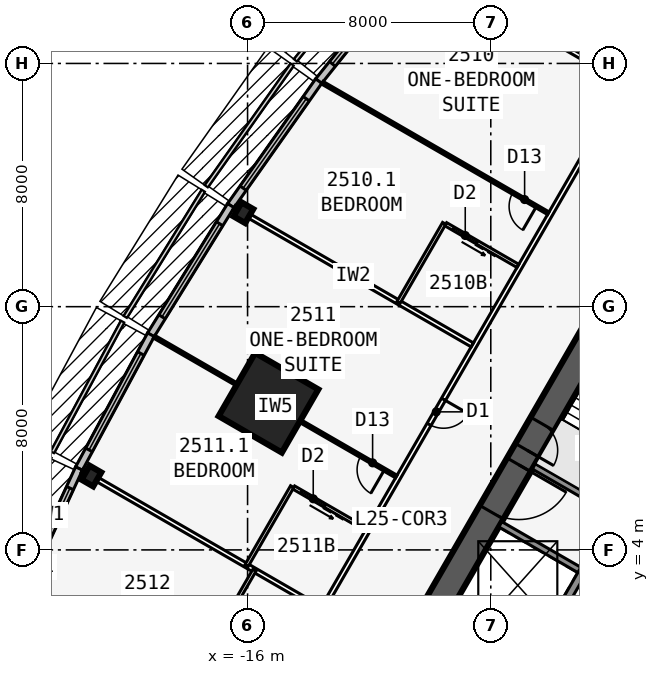
"""IFC4 building model, lengths in metres.
Left out: names, types, materials, properties, quantities, classifications, styles, units other than length and angle.
Written with IfcOpenShell. Run it as: python <this file> out.ifc"""

import sys

from ifc_helpers import new_model, si_unit, direction, frame, frame_2d, origin, origin_2d, place, context, subcontext, project, spatial, rectangle, i_section, extrude, element, fill, save


model = new_model("IFC4")
c1 = context("Model", 3, precision=1e-05, world=origin(), true_north=direction((0.0, 1.0)))
c2 = subcontext(c1, "Body", "Model", "MODEL_VIEW")
j1 = project(units=[si_unit("LENGTHUNIT", "METRE"), si_unit("PLANEANGLEUNIT", "RADIAN")], contexts=[c1])
p1 = place(None, origin())
s1 = spatial("IfcSite", under=j1, at=p1, CompositionType="ELEMENT")
p2 = place(p1, origin())
s2 = spatial("IfcBuilding", under=s1, at=p2, CompositionType="ELEMENT")
p3 = place(p2, frame((0.0, 0.0, 96.5)))
s3 = spatial("IfcBuildingStorey", under=s2, at=p3, CompositionType="ELEMENT", Elevation=96.5)
p4 = place(p3, frame((0.0, 19.052, 0.0), z_axis=(0.0, 0.0, 1.0), x_axis=(-0.499999749417, -0.866025548458, 0.0)))
e1 = element("IfcWall", 1, at=p4, inside=s3, PredefinedType="SHEAR", context=c2, shape_type="SweptSolid", body=[
    extrude(rectangle(XDim=33.0, YDim=0.9, at=frame_2d((16.5, 0.0))), origin(), (0.0, 0.0, 1.0), 3.4),
])
p5 = place(p4, frame((14.15, 0.0, 0.0)))
e2 = element("IfcOpeningElement", 2, at=p5, cuts=e1, PredefinedType="OPENING", context=c2, shape_type="SweptSolid", body=[
    extrude(rectangle(XDim=1.8, YDim=2.13, at=frame_2d((0.9, 1.065))), frame((0.0, 0.46, 0.0), z_axis=(0.0, -1.0, 0.0), x_axis=(1.0, 0.0, 0.0)), (0.0, 0.0, 1.0), 0.92),
])
p6 = place(p4, frame((12.6, 0.0, 0.0)))
e3 = element("IfcOpeningElement", 3, at=p6, cuts=e1, PredefinedType="OPENING", context=c2, shape_type="SweptSolid", body=[
    extrude(rectangle(XDim=1.0, YDim=2.13, at=frame_2d((0.5, 1.065))), frame((0.0, 0.46, 0.0), z_axis=(0.0, -1.0, 0.0), x_axis=(1.0, 0.0, 0.0)), (0.0, 0.0, 1.0), 0.92),
])
p7 = place(p3, frame((-4.929, 3.365, 0.0), z_axis=(0.0, 0.0, 1.0), x_axis=(-0.499991433582, -0.866030349552, 0.0)))
e4 = element("IfcWall", 4, at=p7, inside=s3, PredefinedType="SOLIDWALL", context=c2, shape_type="SweptSolid", body=[
    extrude(rectangle(XDim=10.633, YDim=0.25, at=frame_2d((5.316, 0.0))), origin(), (0.0, 0.0, 1.0), 3.235),
])
p8 = place(p7, frame((9.164, 0.0, 0.0)))
e5 = element("IfcOpeningElement", 5, at=p8, cuts=e4, PredefinedType="OPENING", context=c2, shape_type="SweptSolid", body=[
    extrude(rectangle(XDim=0.9, YDim=2.13, at=frame_2d((0.45, 1.065))), frame((0.0, 0.135, 0.0), z_axis=(0.0, -1.0, 0.0), x_axis=(1.0, 0.0, 0.0)), (0.0, 0.0, 1.0), 0.27),
])
for number, where, z_axis, x_axis in (
    (6, (-3.879, 5.184, 0.0), (0.0, 0.0, 1.0), (-0.866, 0.5, 0.0)),
    (7, (-4.979, 3.279, 0.0), (0.0, 0.0, 1.0), (-0.866, 0.5, 0.0)),
):
    element("IfcWall", number, at=place(p3, frame(where, z_axis=z_axis, x_axis=x_axis)), inside=s3, PredefinedType="SOLIDWALL", context=c2, shape_type="SweptSolid", body=[
        extrude(rectangle(XDim=3.125, YDim=0.2, at=frame_2d((1.562, 0.0))), origin(), (0.0, 0.0, 1.0), 3.235),
    ])
for number, where, z_axis, x_axis in (
    (8, (-16.137, 15.09, 0.0), (0.0, 0.0, 1.0), (-0.866, 0.5, 0.0)),
    (9, (-21.137, 6.43, 0.0), (0.0, 0.0, 1.0), (-0.866, 0.5, 0.0)),
):
    element("IfcColumn", number, at=place(p3, frame(where, z_axis=z_axis, x_axis=x_axis)), inside=s3, PredefinedType="COLUMN", context=c2, shape_type="SweptSolid", body=[
        extrude(i_section(OverallWidth=0.442, OverallDepth=0.531, WebThickness=0.066, FlangeThickness=0.106, at=origin_2d()), origin(), (0.0, 0.0, 1.0), 3.4),
    ])
p9 = place(p3, frame((-15.312, 8.84, 0.0), z_axis=(0.0, 0.0, 1.0), x_axis=(-0.866025403784, 0.5, 0.0)))
e10 = element("IfcColumn", 10, at=p9, inside=s3, PredefinedType="COLUMN", context=c2, shape_type="SweptSolid", body=[
    extrude(rectangle(XDim=2.4, YDim=2.4, at=origin_2d()), origin(), (0.0, 0.0, 1.0), 3.4),
])
p10 = place(p3, frame((-10.505, 23.364, 0.0), z_axis=(0.0, 0.0, 1.0), x_axis=(-0.624594965756, -0.780948864364, 0.0)))
e11 = element("IfcWall", 11, at=p10, inside=s3, PredefinedType="STANDARD", context=c2, shape_type="SweptSolid", body=[
    extrude(rectangle(XDim=5.058, YDim=0.25, at=frame_2d((2.529, 0.0))), origin(), (0.0, 0.0, 1.0), 3.235),
])
p11 = place(p10, frame((0.729, 0.0, 0.45)))
e12 = element("IfcOpeningElement", 12, at=p11, cuts=e11, PredefinedType="OPENING", context=c2, shape_type="SweptSolid", body=[
    extrude(rectangle(XDim=3.6, YDim=2.4, at=frame_2d((1.8, 1.2))), frame((0.0, 0.135, 0.0), z_axis=(0.0, -1.0, 0.0), x_axis=(1.0, 0.0, 0.0)), (0.0, 0.0, 1.0), 0.27),
])
p12 = place(p3, frame((-13.659, 19.42, 0.0), z_axis=(0.0, 0.0, 1.0), x_axis=(-0.5766431066, -0.81699616132, 0.0)))
e13 = element("IfcWall", 13, at=p12, inside=s3, PredefinedType="STANDARD", context=c2, shape_type="SweptSolid", body=[
    extrude(rectangle(XDim=5.021, YDim=0.25, at=frame_2d((2.51, 0.0))), origin(), (0.0, 0.0, 1.0), 3.235),
])
p13 = place(p12, frame((0.71, 0.0, 0.45)))
e14 = element("IfcOpeningElement", 14, at=p13, cuts=e13, PredefinedType="OPENING", context=c2, shape_type="SweptSolid", body=[
    extrude(rectangle(XDim=3.6, YDim=2.4, at=frame_2d((1.8, 1.2))), frame((0.0, 0.135, 0.0), z_axis=(0.0, -1.0, 0.0), x_axis=(1.0, 0.0, 0.0)), (0.0, 0.0, 1.0), 0.27),
])
p14 = place(p3, frame((-16.551, 15.324, 0.0), z_axis=(0.0, 0.0, 1.0), x_axis=(-0.526132807704, -0.850402415717, 0.0)))
e15 = element("IfcWall", 15, at=p14, inside=s3, PredefinedType="STANDARD", context=c2, shape_type="SweptSolid", body=[
    extrude(rectangle(XDim=5.002, YDim=0.25, at=frame_2d((2.501, 0.0))), origin(), (0.0, 0.0, 1.0), 3.235),
])
p15 = place(p14, frame((0.701, 0.0, 0.45)))
e16 = element("IfcOpeningElement", 16, at=p15, cuts=e15, PredefinedType="OPENING", context=c2, shape_type="SweptSolid", body=[
    extrude(rectangle(XDim=3.6, YDim=2.4, at=frame_2d((1.8, 1.2))), frame((0.0, 0.135, 0.0), z_axis=(0.0, -1.0, 0.0), x_axis=(1.0, 0.0, 0.0)), (0.0, 0.0, 1.0), 0.27),
])
p16 = place(p3, frame((-19.178, 11.077, 0.0), z_axis=(0.0, 0.0, 1.0), x_axis=(-0.473412820489, -0.880840678782, 0.0)))
e17 = element("IfcWall", 17, at=p16, inside=s3, PredefinedType="STANDARD", context=c2, shape_type="SweptSolid", body=[
    extrude(rectangle(XDim=5.002, YDim=0.25, at=frame_2d((2.501, 0.0))), origin(), (0.0, 0.0, 1.0), 3.235),
])
p17 = place(p16, frame((0.701, 0.0, 0.45)))
e18 = element("IfcOpeningElement", 18, at=p17, cuts=e17, PredefinedType="OPENING", context=c2, shape_type="SweptSolid", body=[
    extrude(rectangle(XDim=3.6, YDim=2.4, at=frame_2d((1.8, 1.2))), frame((0.0, 0.135, 0.0), z_axis=(0.0, -1.0, 0.0), x_axis=(1.0, 0.0, 0.0)), (0.0, 0.0, 1.0), 0.27),
])
p18 = place(p3, frame((-21.543, 6.678, 0.0), z_axis=(0.0, 0.0, 1.0), x_axis=(-0.419203100754, -0.907892482796, 0.0)))
e19 = element("IfcWall", 19, at=p18, inside=s3, PredefinedType="STANDARD", context=c2, shape_type="SweptSolid", body=[
    extrude(rectangle(XDim=5.021, YDim=0.25, at=frame_2d((2.51, 0.0))), origin(), (0.0, 0.0, 1.0), 3.235),
])
p19 = place(p18, frame((0.71, 0.0, 0.45)))
e20 = element("IfcOpeningElement", 20, at=p19, cuts=e19, PredefinedType="OPENING", context=c2, shape_type="SweptSolid", body=[
    extrude(rectangle(XDim=3.6, YDim=2.4, at=frame_2d((1.8, 1.2))), frame((0.0, 0.135, 0.0), z_axis=(0.0, -1.0, 0.0), x_axis=(1.0, 0.0, 0.0)), (0.0, 0.0, 1.0), 0.27),
])
p20 = place(p3, frame((-0.5, 24.636, 0.0), z_axis=(0.0, 0.0, 1.0), x_axis=(-0.500001915564, -0.86602429783, 0.0)))
e21 = element("IfcWall", 21, at=p20, inside=s3, PredefinedType="PARTITIONING", context=c2, shape_type="SweptSolid", body=[
    extrude(rectangle(XDim=42.172, YDim=0.15, at=frame_2d((21.086, 0.0))), origin(), (0.0, 0.0, 1.0), 3.235),
])
p21 = place(p20, frame((1.911, 0.0, 0.0)))
e22 = element("IfcOpeningElement", 22, at=p21, cuts=e21, PredefinedType="OPENING", context=c2, shape_type="SweptSolid", body=[
    extrude(rectangle(XDim=0.95, YDim=2.13, at=frame_2d((0.475, 1.065))), frame((0.0, 0.085, 0.0), z_axis=(0.0, -1.0, 0.0), x_axis=(1.0, 0.0, 0.0)), (0.0, 0.0, 1.0), 0.17),
])
p22 = place(p20, frame((8.111, 0.0, 0.0)))
e23 = element("IfcOpeningElement", 23, at=p22, cuts=e21, PredefinedType="OPENING", context=c2, shape_type="SweptSolid", body=[
    extrude(rectangle(XDim=0.95, YDim=2.13, at=frame_2d((0.475, 1.065))), frame((0.0, 0.085, 0.0), z_axis=(0.0, -1.0, 0.0), x_axis=(1.0, 0.0, 0.0)), (0.0, 0.0, 1.0), 0.17),
])
p23 = place(p20, frame((18.111, 0.0, 0.0)))
e24 = element("IfcOpeningElement", 24, at=p23, cuts=e21, PredefinedType="OPENING", context=c2, shape_type="SweptSolid", body=[
    extrude(rectangle(XDim=0.95, YDim=2.13, at=frame_2d((0.475, 1.065))), frame((0.0, 0.085, 0.0), z_axis=(0.0, -1.0, 0.0), x_axis=(1.0, 0.0, 0.0)), (0.0, 0.0, 1.0), 0.17),
])
p24 = place(p20, frame((28.711, 0.0, 0.0)))
e25 = element("IfcOpeningElement", 25, at=p24, cuts=e21, PredefinedType="OPENING", context=c2, shape_type="SweptSolid", body=[
    extrude(rectangle(XDim=0.95, YDim=2.13, at=frame_2d((0.475, 1.065))), frame((0.0, 0.085, 0.0), z_axis=(0.0, -1.0, 0.0), x_axis=(1.0, 0.0, 0.0)), (0.0, 0.0, 1.0), 0.17),
])
p25 = place(p20, frame((33.711, 0.0, 0.0)))
e26 = element("IfcOpeningElement", 26, at=p25, cuts=e21, PredefinedType="OPENING", context=c2, shape_type="SweptSolid", body=[
    extrude(rectangle(XDim=0.95, YDim=2.13, at=frame_2d((0.475, 1.065))), frame((0.0, 0.085, 0.0), z_axis=(0.0, -1.0, 0.0), x_axis=(1.0, 0.0, 0.0)), (0.0, 0.0, 1.0), 0.17),
])
p26 = place(p20, frame((39.311, 0.0, 0.0)))
e27 = element("IfcOpeningElement", 27, at=p26, cuts=e21, PredefinedType="OPENING", context=c2, shape_type="SweptSolid", body=[
    extrude(rectangle(XDim=0.95, YDim=2.13, at=frame_2d((0.475, 1.065))), frame((0.0, 0.085, 0.0), z_axis=(0.0, -1.0, 0.0), x_axis=(1.0, 0.0, 0.0)), (0.0, 0.0, 1.0), 0.17),
])
p27 = place(p3, frame((-3.608, 19.404, 0.0), z_axis=(0.0, 0.0, 1.0), x_axis=(-0.866021300503, 0.500007107024, 0.0)))
e28 = element("IfcWall", 28, at=p27, inside=s3, PredefinedType="PARTITIONING", context=c2, shape_type="SweptSolid", body=[
    extrude(rectangle(XDim=7.82, YDim=0.15, at=frame_2d((3.91, 0.0))), origin(), (0.0, 0.0, 1.0), 2.389),
])
p28 = place(p3, frame((-6.108, 15.073, 0.0), z_axis=(0.0, 0.0, 1.0), x_axis=(-0.866031196456, 0.499989966665, 0.0)))
e29 = element("IfcWall", 29, at=p28, inside=s3, PredefinedType="PARTITIONING", context=c2, shape_type="SweptSolid", body=[
    extrude(rectangle(XDim=8.585, YDim=0.1, at=frame_2d((4.292, 0.0))), origin(), (0.0, 0.0, 1.0), 2.389),
])
p29 = place(p28, frame((0.45, 0.0, 0.0)))
e30 = element("IfcOpeningElement", 30, at=p29, cuts=e29, PredefinedType="OPENING", context=c2, shape_type="SweptSolid", body=[
    extrude(rectangle(XDim=0.9, YDim=2.13, at=frame_2d((0.45, 1.065))), frame((0.0, 0.06, 0.0), z_axis=(0.0, -1.0, 0.0), x_axis=(1.0, 0.0, 0.0)), (0.0, 0.0, 1.0), 0.12),
])
p30 = place(p3, frame((-8.608, 10.743, 0.0), z_axis=(0.0, 0.0, 1.0), x_axis=(-0.866028232062, 0.499995101247, 0.0)))
e31 = element("IfcWall", 31, at=p30, inside=s3, PredefinedType="PARTITIONING", context=c2, shape_type="SweptSolid", body=[
    extrude(rectangle(XDim=9.043, YDim=0.15, at=frame_2d((4.521, 0.0))), origin(), (0.0, 0.0, 1.0), 2.389),
])
p31 = place(p3, frame((-11.108, 6.413, 0.0), z_axis=(0.0, 0.0, 1.0), x_axis=(-0.866022450903, 0.500005114506, 0.0)))
e32 = element("IfcWall", 32, at=p31, inside=s3, PredefinedType="PARTITIONING", context=c2, shape_type="SweptSolid", body=[
    extrude(rectangle(XDim=9.196, YDim=0.1, at=frame_2d((4.598, 0.0))), origin(), (0.0, 0.0, 1.0), 2.389),
])
p32 = place(p31, frame((0.45, 0.0, 0.0)))
e33 = element("IfcOpeningElement", 33, at=p32, cuts=e32, PredefinedType="OPENING", context=c2, shape_type="SweptSolid", body=[
    extrude(rectangle(XDim=0.9, YDim=2.13, at=frame_2d((0.45, 1.065))), frame((0.0, 0.06, 0.0), z_axis=(0.0, -1.0, 0.0), x_axis=(1.0, 0.0, 0.0)), (0.0, 0.0, 1.0), 0.12),
])
p33 = place(p3, frame((-13.608, 2.083, 0.0), z_axis=(0.0, 0.0, 1.0), x_axis=(-0.866028232062, 0.499995101247, 0.0)))
e34 = element("IfcWall", 34, at=p33, inside=s3, PredefinedType="PARTITIONING", context=c2, shape_type="SweptSolid", body=[
    extrude(rectangle(XDim=9.043, YDim=0.15, at=frame_2d((4.521, 0.0))), origin(), (0.0, 0.0, 1.0), 2.389),
])
p34 = place(p3, frame((-9.533, 14.741, 0.0), z_axis=(0.0, 0.0, 1.0), x_axis=(-0.50002537861, -0.866010750942, 0.0)))
e35 = element("IfcWall", 35, at=p34, inside=s3, PredefinedType="PLUMBINGWALL", context=c2, shape_type="SweptSolid", body=[
    extrude(rectangle(XDim=3.0, YDim=0.12, at=frame_2d((1.5, 0.0))), origin(), (0.0, 0.0, 1.0), 3.235),
])
p35 = place(p3, frame((-7.108, 13.341, 0.0), z_axis=(0.0, 0.0, 1.0), x_axis=(-0.866035715982, 0.499982138324, 0.0)))
e36 = element("IfcWall", 36, at=p35, inside=s3, PredefinedType="PLUMBINGWALL", context=c2, shape_type="SweptSolid", body=[
    extrude(rectangle(XDim=2.74, YDim=0.12, at=frame_2d((1.37, 0.0))), origin(), (0.0, 0.0, 1.0), 3.235),
])
p36 = place(p35, frame((1.55, 0.0, 0.0)))
e37 = element("IfcOpeningElement", 37, at=p36, cuts=e36, PredefinedType="OPENING", context=c2, shape_type="SweptSolid", body=[
    extrude(rectangle(XDim=0.9, YDim=2.13, at=frame_2d((0.45, 1.065))), frame((0.0, 0.07, 0.0), z_axis=(0.0, -1.0, 0.0), x_axis=(1.0, 0.0, 0.0)), (0.0, 0.0, 1.0), 0.14),
])
p37 = place(p3, frame((-14.533, 6.081, 0.0), z_axis=(0.0, 0.0, 1.0), x_axis=(-0.499990139034, -0.866031096941, 0.0)))
e38 = element("IfcWall", 38, at=p37, inside=s3, PredefinedType="PLUMBINGWALL", context=c2, shape_type="SweptSolid", body=[
    extrude(rectangle(XDim=3.0, YDim=0.12, at=frame_2d((1.5, 0.0))), origin(), (0.0, 0.0, 1.0), 3.235),
])
p38 = place(p3, frame((-12.108, 4.681, 0.0), z_axis=(0.0, 0.0, 1.0), x_axis=(-0.866035715982, 0.499982138324, 0.0)))
e39 = element("IfcWall", 39, at=p38, inside=s3, PredefinedType="PLUMBINGWALL", context=c2, shape_type="SweptSolid", body=[
    extrude(rectangle(XDim=2.74, YDim=0.12, at=frame_2d((1.37, 0.0))), origin(), (0.0, 0.0, 1.0), 3.235),
])
p39 = place(p38, frame((1.55, 0.0, 0.0)))
e40 = element("IfcOpeningElement", 40, at=p39, cuts=e39, PredefinedType="OPENING", context=c2, shape_type="SweptSolid", body=[
    extrude(rectangle(XDim=0.9, YDim=2.13, at=frame_2d((0.45, 1.065))), frame((0.0, 0.07, 0.0), z_axis=(0.0, -1.0, 0.0), x_axis=(1.0, 0.0, 0.0)), (0.0, 0.0, 1.0), 0.14),
])
p40 = place(p3, frame((-15.773, 3.333, 0.0), z_axis=(0.0, 0.0, 1.0), x_axis=(-0.500001309137, -0.866024647952, 0.0)))
e41 = element("IfcWall", 41, at=p40, inside=s3, PredefinedType="PLUMBINGWALL", context=c2, shape_type="SweptSolid", body=[
    extrude(rectangle(XDim=2.4, YDim=0.12, at=frame_2d((1.2, 0.0))), origin(), (0.0, 0.0, 1.0), 3.235),
])
p41 = place(p11, origin())
e42 = element("IfcWindow", 42, at=p41, inside=s3, PartitioningType="SINGLE_PANEL", PredefinedType="WINDOW", context=c2, shape_type="SweptSolid", body=[
    extrude(rectangle(XDim=3.6, YDim=2.4, at=frame_2d((1.8, 1.2))), frame((0.0, 0.03, 0.0), z_axis=(0.0, -1.0, 0.0), x_axis=(1.0, 0.0, 0.0)), (0.0, 0.0, 1.0), 0.06),
])
fill(e12, e42)
p42 = place(p13, origin())
e43 = element("IfcWindow", 43, at=p42, inside=s3, PartitioningType="SINGLE_PANEL", PredefinedType="WINDOW", context=c2, shape_type="SweptSolid", body=[
    extrude(rectangle(XDim=3.6, YDim=2.4, at=frame_2d((1.8, 1.2))), frame((0.0, 0.03, 0.0), z_axis=(0.0, -1.0, 0.0), x_axis=(1.0, 0.0, 0.0)), (0.0, 0.0, 1.0), 0.06),
])
fill(e14, e43)
p43 = place(p15, origin())
e44 = element("IfcWindow", 44, at=p43, inside=s3, PartitioningType="SINGLE_PANEL", PredefinedType="WINDOW", context=c2, shape_type="SweptSolid", body=[
    extrude(rectangle(XDim=3.6, YDim=2.4, at=frame_2d((1.8, 1.2))), frame((0.0, 0.03, 0.0), z_axis=(0.0, -1.0, 0.0), x_axis=(1.0, 0.0, 0.0)), (0.0, 0.0, 1.0), 0.06),
])
fill(e16, e44)
p44 = place(p17, origin())
e45 = element("IfcWindow", 45, at=p44, inside=s3, PartitioningType="SINGLE_PANEL", PredefinedType="WINDOW", context=c2, shape_type="SweptSolid", body=[
    extrude(rectangle(XDim=3.6, YDim=2.4, at=frame_2d((1.8, 1.2))), frame((0.0, 0.03, 0.0), z_axis=(0.0, -1.0, 0.0), x_axis=(1.0, 0.0, 0.0)), (0.0, 0.0, 1.0), 0.06),
])
fill(e18, e45)
p45 = place(p19, origin())
e46 = element("IfcWindow", 46, at=p45, inside=s3, PartitioningType="SINGLE_PANEL", PredefinedType="WINDOW", context=c2, shape_type="SweptSolid", body=[
    extrude(rectangle(XDim=3.6, YDim=2.4, at=frame_2d((1.8, 1.2))), frame((0.0, 0.03, 0.0), z_axis=(0.0, -1.0, 0.0), x_axis=(1.0, 0.0, 0.0)), (0.0, 0.0, 1.0), 0.06),
])
fill(e20, e46)
p46 = place(p29, origin())
e47 = element("IfcDoor", 47, at=p46, inside=s3, OperationType="SINGLE_SWING_LEFT", PredefinedType="DOOR", context=c2, shape_type="SweptSolid", body=[
    extrude(rectangle(XDim=0.9, YDim=2.13, at=frame_2d((0.45, 1.065))), frame((0.0, 0.025, 0.0), z_axis=(0.0, -1.0, 0.0), x_axis=(1.0, 0.0, 0.0)), (0.0, 0.0, 1.0), 0.05),
])
fill(e30, e47)
p47 = place(p32, origin())
e48 = element("IfcDoor", 48, at=p47, inside=s3, OperationType="SINGLE_SWING_LEFT", PredefinedType="DOOR", context=c2, shape_type="SweptSolid", body=[
    extrude(rectangle(XDim=0.9, YDim=2.13, at=frame_2d((0.45, 1.065))), frame((0.0, 0.025, 0.0), z_axis=(0.0, -1.0, 0.0), x_axis=(1.0, 0.0, 0.0)), (0.0, 0.0, 1.0), 0.05),
])
fill(e33, e48)
p48 = place(p36, origin())
e49 = element("IfcDoor", 49, at=p48, inside=s3, OperationType="SLIDING_TO_LEFT", PredefinedType="DOOR", context=c2, shape_type="SweptSolid", body=[
    extrude(rectangle(XDim=0.9, YDim=2.13, at=frame_2d((0.45, 1.065))), frame((0.0, 0.025, 0.0), z_axis=(0.0, -1.0, 0.0), x_axis=(1.0, 0.0, 0.0)), (0.0, 0.0, 1.0), 0.05),
])
fill(e37, e49)
p49 = place(p23, origin())
e50 = element("IfcDoor", 50, at=p49, inside=s3, OperationType="SINGLE_SWING_LEFT", PredefinedType="DOOR", context=c2, shape_type="SweptSolid", body=[
    extrude(rectangle(XDim=0.95, YDim=2.13, at=frame_2d((0.475, 1.065))), frame((0.0, 0.025, 0.0), z_axis=(0.0, -1.0, 0.0), x_axis=(1.0, 0.0, 0.0)), (0.0, 0.0, 1.0), 0.05),
])
fill(e24, e50)
p50 = place(p39, origin())
e51 = element("IfcDoor", 51, at=p50, inside=s3, OperationType="SLIDING_TO_LEFT", PredefinedType="DOOR", context=c2, shape_type="SweptSolid", body=[
    extrude(rectangle(XDim=0.9, YDim=2.13, at=frame_2d((0.45, 1.065))), frame((0.0, 0.025, 0.0), z_axis=(0.0, -1.0, 0.0), x_axis=(1.0, 0.0, 0.0)), (0.0, 0.0, 1.0), 0.05),
])
fill(e40, e51)
p51 = place(p5, origin())
e52 = element("IfcDoor", 52, at=p51, inside=s3, OperationType="DOUBLE_DOOR_SINGLE_SWING", PredefinedType="DOOR", context=c2, shape_type="SweptSolid", body=[
    extrude(rectangle(XDim=1.8, YDim=2.13, at=frame_2d((0.9, 1.065))), frame((0.0, 0.025, 0.0), z_axis=(0.0, -1.0, 0.0), x_axis=(1.0, 0.0, 0.0)), (0.0, 0.0, 1.0), 0.05),
])
fill(e2, e52)
p52 = place(p6, origin())
e53 = element("IfcDoor", 53, at=p52, inside=s3, OperationType="SINGLE_SWING_RIGHT", PredefinedType="DOOR", context=c2, shape_type="SweptSolid", body=[
    extrude(rectangle(XDim=1.0, YDim=2.13, at=frame_2d((0.5, 1.065))), frame((0.0, 0.025, 0.0), z_axis=(0.0, -1.0, 0.0), x_axis=(1.0, 0.0, 0.0)), (0.0, 0.0, 1.0), 0.05),
])
fill(e3, e53)
save(model, sys.argv[1])
